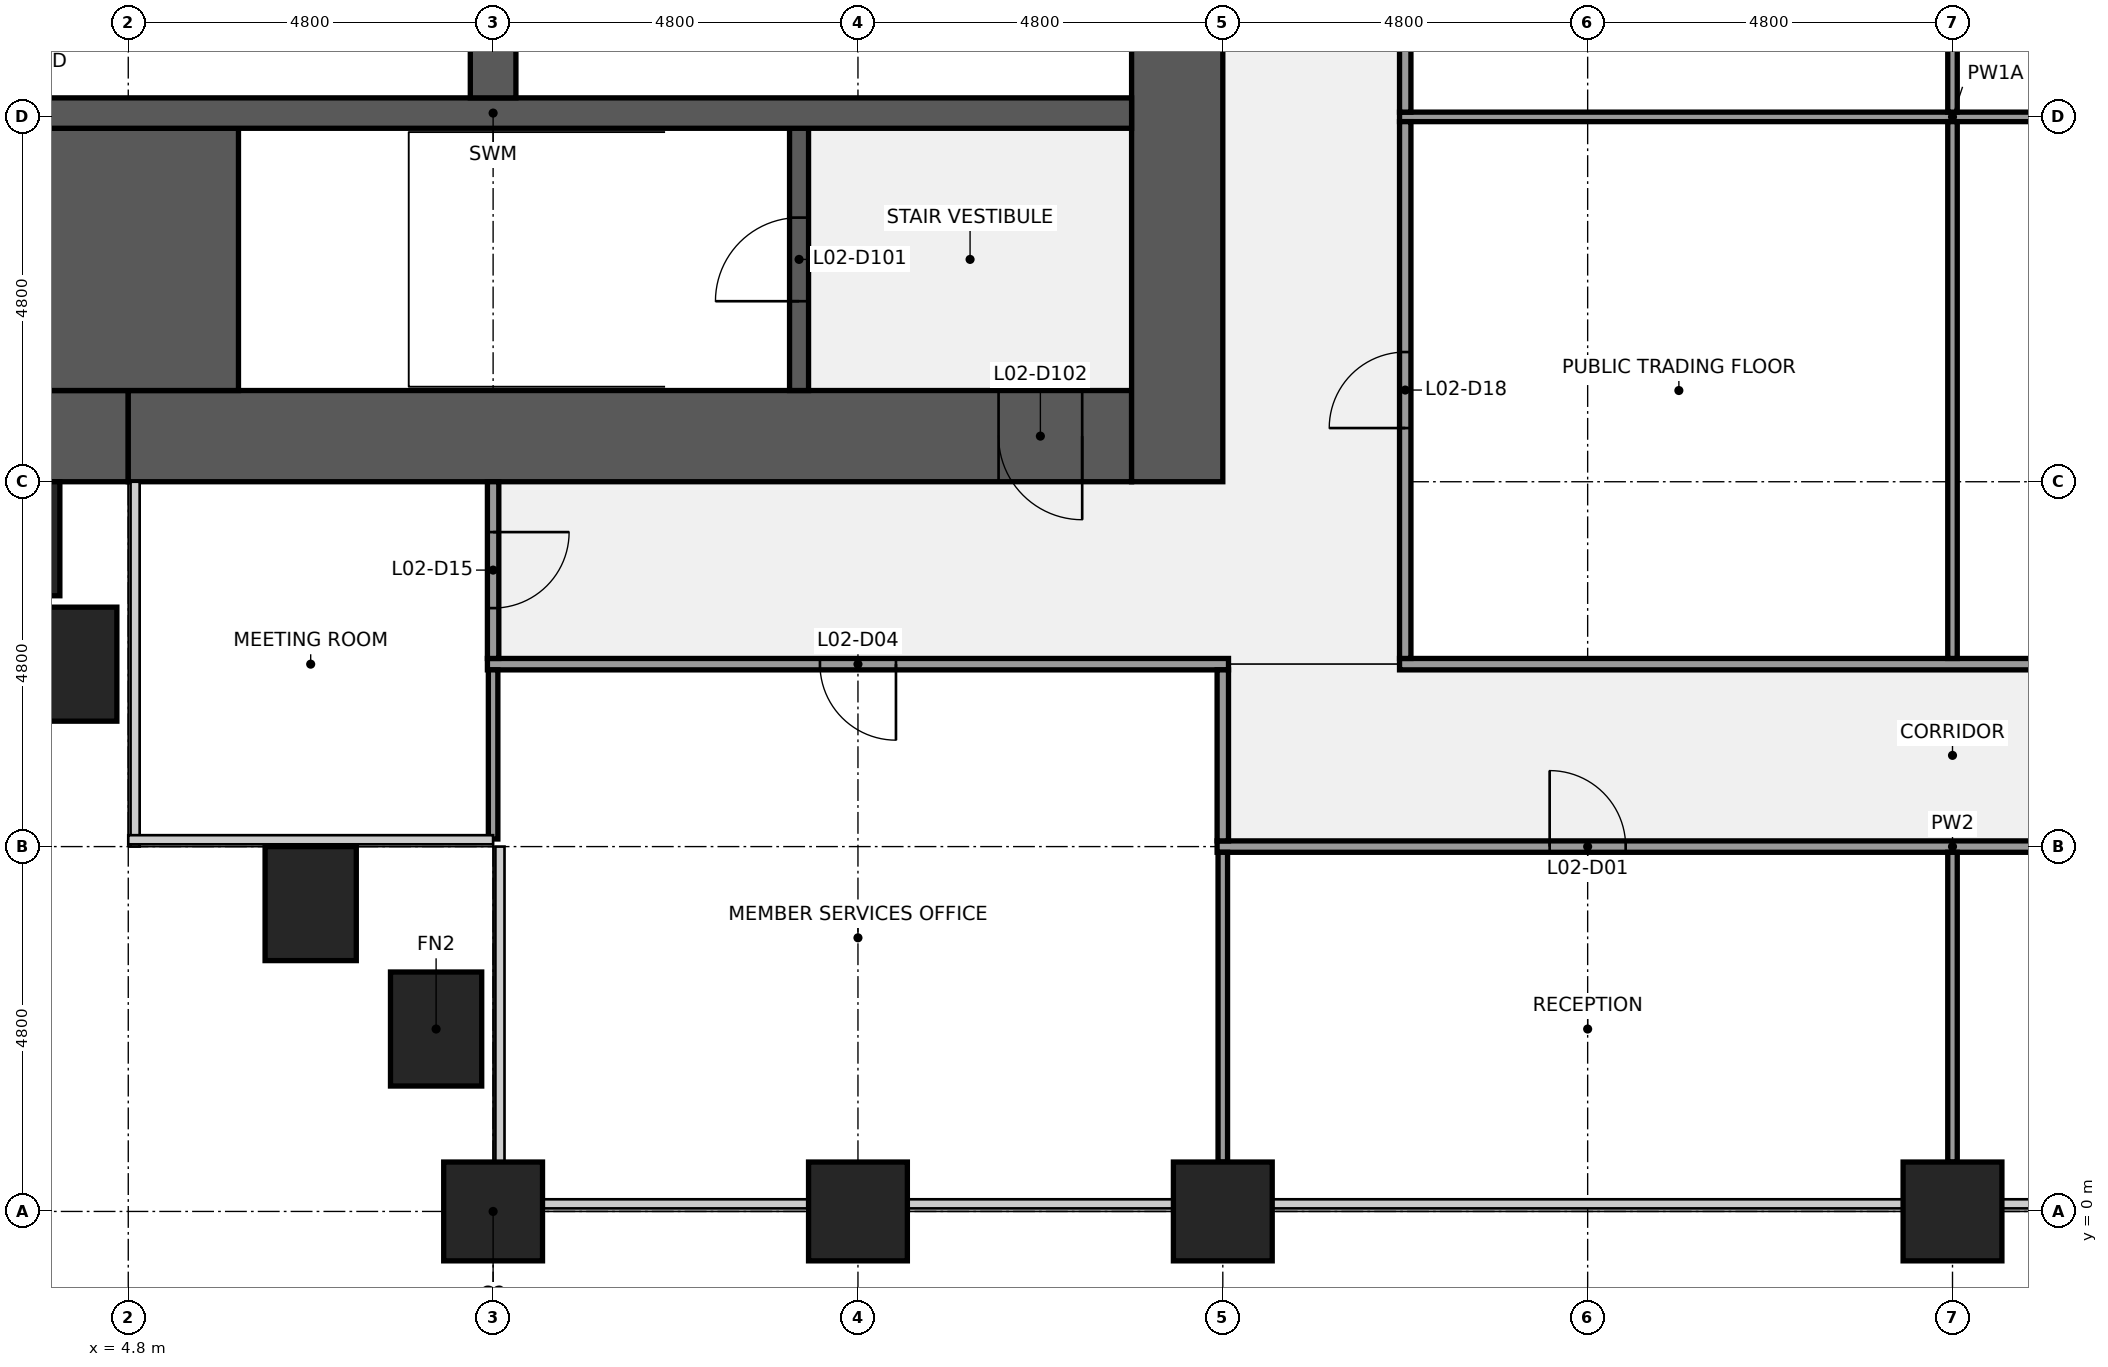
"""IFC4 building model, lengths in metres.
Left out: names, types, materials, properties, quantities, classifications, styles, units other than length and angle.
Written with IfcOpenShell. Run it as: python <this file> out.ifc"""

import sys

from ifc_helpers import new_model, si_unit, direction, frame, frame_2d, origin, origin_2d, place, context, subcontext, project, spatial, rectangle, extrude, element, fill, save


model = new_model("IFC4")
c1 = context("Model", 3, precision=1e-05, world=origin(), true_north=direction((0.0, 1.0)))
c2 = subcontext(c1, "Body", "Model", "MODEL_VIEW")
j1 = project(units=[si_unit("LENGTHUNIT", "METRE"), si_unit("PLANEANGLEUNIT", "RADIAN")], contexts=[c1])
p1 = place(None, origin())
s1 = spatial("IfcSite", under=j1, at=p1, CompositionType="ELEMENT")
p2 = place(p1, origin())
s2 = spatial("IfcBuilding", under=s1, at=p2, CompositionType="ELEMENT")
p3 = place(p2, frame((0.0, 0.0, 17.0)))
s3 = spatial("IfcBuildingStorey", under=s2, at=p3, CompositionType="ELEMENT", Elevation=17.0)
for number, where, z_axis, x_axis in (
    (1, (9.6, 0.0, 0.0), (0.0, 0.0, 1.0), (1.0, 0.0, 0.0)),
    (2, (14.4, 0.0, 0.0), (0.0, 0.0, 1.0), (1.0, 0.0, 0.0)),
    (3, (19.2, 0.0, 0.0), (0.0, 0.0, 1.0), (1.0, 0.0, 0.0)),
    (4, (28.8, 0.0, 0.0), (0.0, 0.0, 1.0), (1.0, 0.0, 0.0)),
):
    element("IfcColumn", number, at=place(p3, frame(where, z_axis=z_axis, x_axis=x_axis)), inside=s3, PredefinedType="COLUMN", context=c2, shape_type="SweptSolid", body=[
        extrude(rectangle(XDim=1.3, YDim=1.3, at=origin_2d()), origin(), (0.0, 0.0, 1.0), 4.4),
    ])
p4 = place(p3, frame((4.8, 10.2, 0.0), z_axis=(0.0, 0.0, 1.0), x_axis=(-1.0, 0.0, 0.0)))
e5 = element("IfcWall", 5, at=p4, inside=s3, PredefinedType="SHEAR", context=c2, shape_type="SweptSolid", body=[
    extrude(rectangle(XDim=3.6, YDim=1.2, at=frame_2d((1.8, 0.0))), origin(), (0.0, 0.0, 1.0), 4.24),
])
p5 = place(p3, frame((18.0, 10.2, 0.0), z_axis=(0.0, 0.0, 1.0), x_axis=(-1.0, 0.0, 0.0)))
e6 = element("IfcWall", 6, at=p5, inside=s3, PredefinedType="SHEAR", context=c2, shape_type="SweptSolid", body=[
    extrude(rectangle(XDim=13.2, YDim=1.2, at=frame_2d((6.6, 0.0))), origin(), (0.0, 0.0, 1.0), 4.24),
])
p6 = place(p5, frame((0.65, 0.0, 0.0)))
e7 = element("IfcOpeningElement", 7, at=p6, cuts=e6, PredefinedType="OPENING", context=c2, shape_type="SweptSolid", body=[
    extrude(rectangle(XDim=1.1, YDim=2.1, at=frame_2d((0.55, 1.05))), frame((0.0, 0.61, 0.0), z_axis=(0.0, -1.0, 0.0), x_axis=(1.0, 0.0, 0.0)), (0.0, 0.0, 1.0), 1.22),
])
p7 = place(p3, frame((18.6, 38.4, 0.0), z_axis=(0.0, 0.0, 1.0), x_axis=(0.0, -1.0, 0.0)))
e8 = element("IfcWall", 8, at=p7, inside=s3, PredefinedType="SHEAR", context=c2, shape_type="SweptSolid", body=[
    extrude(rectangle(XDim=28.8, YDim=1.2, at=frame_2d((14.4, 0.0))), origin(), (0.0, 0.0, 1.0), 4.24),
])
p8 = place(p7, frame((18.3, 0.0, 0.0)))
e9 = element("IfcOpeningElement", 9, at=p8, cuts=e8, PredefinedType="OPENING", context=c2, shape_type="SweptSolid", body=[
    extrude(rectangle(XDim=1.8, YDim=2.1, at=frame_2d((0.9, 1.05))), frame((0.0, 0.61, 0.0), z_axis=(0.0, -1.0, 0.0), x_axis=(1.0, 0.0, 0.0)), (0.0, 0.0, 1.0), 1.22),
])
p9 = place(p7, frame((8.7, 0.0, 0.0)))
e10 = element("IfcOpeningElement", 10, at=p9, cuts=e8, PredefinedType="OPENING", context=c2, shape_type="SweptSolid", body=[
    extrude(rectangle(XDim=1.8, YDim=2.1, at=frame_2d((0.9, 1.05))), frame((0.0, 0.61, 0.0), z_axis=(0.0, -1.0, 0.0), x_axis=(1.0, 0.0, 0.0)), (0.0, 0.0, 1.0), 1.22),
])
p10 = place(p3, frame((1.2, 12.525, 0.0), z_axis=(0.0, 0.0, 1.0), x_axis=(1.0, 0.0, 0.0)))
e11 = element("IfcWall", 11, at=p10, inside=s3, PredefinedType="SHEAR", context=c2, shape_type="SweptSolid", body=[
    extrude(rectangle(XDim=5.05, YDim=3.45, at=frame_2d((2.525, 0.0))), origin(), (0.0, 0.0, 1.0), 4.24),
])
p11 = place(p3, frame((13.625, 10.8, 0.0), z_axis=(0.0, 0.0, 1.0), x_axis=(0.0, 1.0, 0.0)))
e12 = element("IfcWall", 12, at=p11, inside=s3, PredefinedType="SHEAR", context=c2, shape_type="SweptSolid", body=[
    extrude(rectangle(XDim=3.45, YDim=0.25, at=frame_2d((1.725, 0.0))), origin(), (0.0, 0.0, 1.0), 4.24),
])
p12 = place(p11, frame((1.175, 0.0, 0.0)))
e13 = element("IfcOpeningElement", 13, at=p12, cuts=e12, PredefinedType="OPENING", context=c2, shape_type="SweptSolid", body=[
    extrude(rectangle(XDim=1.1, YDim=2.1, at=frame_2d((0.55, 1.05))), frame((0.0, 0.135, 0.0), z_axis=(0.0, -1.0, 0.0), x_axis=(1.0, 0.0, 0.0)), (0.0, 0.0, 1.0), 0.27),
])
p13 = place(p3, frame((1.2, 14.45, 0.0), z_axis=(0.0, 0.0, 1.0), x_axis=(1.0, 0.0, 0.0)))
e14 = element("IfcWall", 14, at=p13, inside=s3, PredefinedType="SHEAR", context=c2, shape_type="SweptSolid", body=[
    extrude(rectangle(XDim=16.8, YDim=0.4, at=frame_2d((8.4, 0.0))), origin(), (0.0, 0.0, 1.0), 4.24),
])
p14 = place(p3, frame((9.6, 14.65, 0.0), z_axis=(0.0, 0.0, 1.0), x_axis=(0.0, 1.0, 0.0)))
e15 = element("IfcWall", 15, at=p14, inside=s3, PredefinedType="SHEAR", context=c2, shape_type="SweptSolid", body=[
    extrude(rectangle(XDim=2.6, YDim=0.6, at=frame_2d((1.3, 0.0))), origin(), (0.0, 0.0, 1.0), 4.24),
])
p15 = place(p3, frame((19.125, 4.8, 0.0), z_axis=(0.0, 0.0, 1.0), x_axis=(1.0, 0.0, 0.0)))
e16 = element("IfcWall", 16, at=p15, inside=s3, PredefinedType="PARTITIONING", context=c2, shape_type="SweptSolid", body=[
    extrude(rectangle(XDim=19.35, YDim=0.15, at=frame_2d((9.675, 0.0))), origin(), (0.0, 0.0, 1.0), 3.25),
])
p16 = place(p15, frame((4.375, 0.0, 0.0)))
e17 = element("IfcOpeningElement", 17, at=p16, cuts=e16, PredefinedType="OPENING", context=c2, shape_type="SweptSolid", body=[
    extrude(rectangle(XDim=1.0, YDim=2.1, at=frame_2d((0.5, 1.05))), frame((0.0, 0.085, 0.0), z_axis=(0.0, -1.0, 0.0), x_axis=(1.0, 0.0, 0.0)), (0.0, 0.0, 1.0), 0.17),
])
p17 = place(p15, frame((11.575, 0.0, 0.0)))
e18 = element("IfcOpeningElement", 18, at=p17, cuts=e16, PredefinedType="OPENING", context=c2, shape_type="SweptSolid", body=[
    extrude(rectangle(XDim=1.0, YDim=2.1, at=frame_2d((0.5, 1.05))), frame((0.0, 0.085, 0.0), z_axis=(0.0, -1.0, 0.0), x_axis=(1.0, 0.0, 0.0)), (0.0, 0.0, 1.0), 0.17),
])
p18 = place(p15, frame((16.375, 0.0, 0.0)))
e19 = element("IfcOpeningElement", 19, at=p18, cuts=e16, PredefinedType="OPENING", context=c2, shape_type="SweptSolid", body=[
    extrude(rectangle(XDim=1.0, YDim=2.1, at=frame_2d((0.5, 1.05))), frame((0.0, 0.085, 0.0), z_axis=(0.0, -1.0, 0.0), x_axis=(1.0, 0.0, 0.0)), (0.0, 0.0, 1.0), 0.17),
])
p19 = place(p3, frame((9.525, 7.2, 0.0), z_axis=(0.0, 0.0, 1.0), x_axis=(1.0, 0.0, 0.0)))
e20 = element("IfcWall", 20, at=p19, inside=s3, PredefinedType="PARTITIONING", context=c2, shape_type="SweptSolid", body=[
    extrude(rectangle(XDim=9.75, YDim=0.15, at=frame_2d((4.875, 0.0))), origin(), (0.0, 0.0, 1.0), 3.25),
])
p20 = place(p19, frame((4.375, 0.0, 0.0)))
e21 = element("IfcOpeningElement", 21, at=p20, cuts=e20, PredefinedType="OPENING", context=c2, shape_type="SweptSolid", body=[
    extrude(rectangle(XDim=1.0, YDim=2.1, at=frame_2d((0.5, 1.05))), frame((0.0, 0.085, 0.0), z_axis=(0.0, -1.0, 0.0), x_axis=(1.0, 0.0, 0.0)), (0.0, 0.0, 1.0), 0.17),
])
p21 = place(p3, frame((21.525, 7.2, 0.0), z_axis=(0.0, 0.0, 1.0), x_axis=(1.0, 0.0, 0.0)))
e22 = element("IfcWall", 22, at=p21, inside=s3, PredefinedType="PARTITIONING", context=c2, shape_type="SweptSolid", body=[
    extrude(rectangle(XDim=14.55, YDim=0.15, at=frame_2d((7.275, 0.0))), origin(), (0.0, 0.0, 1.0), 3.25),
])
p22 = place(p3, frame((21.525, 14.4, 0.0), z_axis=(0.0, 0.0, 1.0), x_axis=(1.0, 0.0, 0.0)))
e23 = element("IfcWall", 23, at=p22, inside=s3, PredefinedType="PARTITIONING", context=c2, shape_type="SweptSolid", body=[
    extrude(rectangle(XDim=14.55, YDim=0.125, at=frame_2d((7.275, 0.0))), origin(), (0.0, 0.0, 1.0), 3.25),
])
p23 = place(p3, frame((9.6, 4.9, 0.0), z_axis=(0.0, 0.0, 1.0), x_axis=(0.0, 1.0, 0.0)))
e24 = element("IfcWall", 24, at=p23, inside=s3, PredefinedType="PARTITIONING", context=c2, shape_type="SweptSolid", body=[
    extrude(rectangle(XDim=2.225, YDim=0.125, at=frame_2d((1.113, 0.0))), origin(), (0.0, 0.0, 1.0), 3.25),
])
p24 = place(p3, frame((9.6, 7.275, 0.0), z_axis=(0.0, 0.0, 1.0), x_axis=(0.0, 1.0, 0.0)))
e25 = element("IfcWall", 25, at=p24, inside=s3, PredefinedType="PARTITIONING", context=c2, shape_type="SweptSolid", body=[
    extrude(rectangle(XDim=2.325, YDim=0.15, at=frame_2d((1.163, 0.0))), origin(), (0.0, 0.0, 1.0), 3.25),
])
p25 = place(p24, frame((0.663, 0.0, 0.0)))
e26 = element("IfcOpeningElement", 26, at=p25, cuts=e25, PredefinedType="OPENING", context=c2, shape_type="SweptSolid", body=[
    extrude(rectangle(XDim=1.0, YDim=2.1, at=frame_2d((0.5, 1.05))), frame((0.0, 0.085, 0.0), z_axis=(0.0, -1.0, 0.0), x_axis=(1.0, 0.0, 0.0)), (0.0, 0.0, 1.0), 0.17),
])
p26 = place(p3, frame((19.2, 0.65, 0.0), z_axis=(0.0, 0.0, 1.0), x_axis=(0.0, 1.0, 0.0)))
e27 = element("IfcWall", 27, at=p26, inside=s3, PredefinedType="PARTITIONING", context=c2, shape_type="SweptSolid", body=[
    extrude(rectangle(XDim=4.075, YDim=0.125, at=frame_2d((2.038, 0.0))), origin(), (0.0, 0.0, 1.0), 3.25),
])
p27 = place(p3, frame((19.2, 4.875, 0.0), z_axis=(0.0, 0.0, 1.0), x_axis=(0.0, 1.0, 0.0)))
e28 = element("IfcWall", 28, at=p27, inside=s3, PredefinedType="PARTITIONING", context=c2, shape_type="SweptSolid", body=[
    extrude(rectangle(XDim=2.25, YDim=0.15, at=frame_2d((1.125, 0.0))), origin(), (0.0, 0.0, 1.0), 3.25),
])
p28 = place(p3, frame((21.6, 7.275, 0.0), z_axis=(0.0, 0.0, 1.0), x_axis=(0.0, 1.0, 0.0)))
e29 = element("IfcWall", 29, at=p28, inside=s3, PredefinedType="PARTITIONING", context=c2, shape_type="SweptSolid", body=[
    extrude(rectangle(XDim=7.062, YDim=0.15, at=frame_2d((3.531, 0.0))), origin(), (0.0, 0.0, 1.0), 3.25),
])
p29 = place(p28, frame((3.031, 0.0, 0.0)))
e30 = element("IfcOpeningElement", 30, at=p29, cuts=e29, PredefinedType="OPENING", context=c2, shape_type="SweptSolid", body=[
    extrude(rectangle(XDim=1.0, YDim=2.1, at=frame_2d((0.5, 1.05))), frame((0.0, 0.085, 0.0), z_axis=(0.0, -1.0, 0.0), x_axis=(1.0, 0.0, 0.0)), (0.0, 0.0, 1.0), 0.17),
])
p30 = place(p3, frame((21.6, 14.462, 0.0), z_axis=(0.0, 0.0, 1.0), x_axis=(0.0, 1.0, 0.0)))
e31 = element("IfcWall", 31, at=p30, inside=s3, PredefinedType="PARTITIONING", context=c2, shape_type="SweptSolid", body=[
    extrude(rectangle(XDim=9.475, YDim=0.15, at=frame_2d((4.738, 0.0))), origin(), (0.0, 0.0, 1.0), 3.25),
])
p31 = place(p30, frame((4.238, 0.0, 0.0)))
e32 = element("IfcOpeningElement", 32, at=p31, cuts=e31, PredefinedType="OPENING", context=c2, shape_type="SweptSolid", body=[
    extrude(rectangle(XDim=1.0, YDim=2.1, at=frame_2d((0.5, 1.05))), frame((0.0, 0.085, 0.0), z_axis=(0.0, -1.0, 0.0), x_axis=(1.0, 0.0, 0.0)), (0.0, 0.0, 1.0), 0.17),
])
p32 = place(p3, frame((28.8, 0.65, 0.0), z_axis=(0.0, 0.0, 1.0), x_axis=(0.0, 1.0, 0.0)))
e33 = element("IfcWall", 33, at=p32, inside=s3, PredefinedType="PARTITIONING", context=c2, shape_type="SweptSolid", body=[
    extrude(rectangle(XDim=4.075, YDim=0.125, at=frame_2d((2.038, 0.0))), origin(), (0.0, 0.0, 1.0), 3.25),
])
p33 = place(p3, frame((28.8, 7.275, 0.0), z_axis=(0.0, 0.0, 1.0), x_axis=(0.0, 1.0, 0.0)))
e34 = element("IfcWall", 34, at=p33, inside=s3, PredefinedType="PARTITIONING", context=c2, shape_type="SweptSolid", body=[
    extrude(rectangle(XDim=7.062, YDim=0.125, at=frame_2d((3.531, 0.0))), origin(), (0.0, 0.0, 1.0), 3.25),
])
p34 = place(p3, frame((28.8, 14.462, 0.0), z_axis=(0.0, 0.0, 1.0), x_axis=(0.0, 1.0, 0.0)))
e35 = element("IfcWall", 35, at=p34, inside=s3, PredefinedType="PARTITIONING", context=c2, shape_type="SweptSolid", body=[
    extrude(rectangle(XDim=9.475, YDim=0.125, at=frame_2d((4.738, 0.0))), origin(), (0.0, 0.0, 1.0), 3.25),
])
for number, where, z_axis, x_axis in (
    (36, (4.05, 7.2, 0.0), (0.0, 0.0, 1.0), (0.0, 1.0, 0.0)),
    (37, (7.2, 4.05, 0.0), (0.0, 0.0, 1.0), (1.0, 0.0, 0.0)),
    (38, (8.85, 2.4, 0.0), (0.0, 0.0, 1.0), (0.0, 1.0, 0.0)),
):
    element("IfcColumn", number, at=place(p3, frame(where, z_axis=z_axis, x_axis=x_axis)), inside=s3, PredefinedType="PILASTER", context=c2, shape_type="SweptSolid", body=[
        extrude(rectangle(XDim=1.2, YDim=1.5, at=origin_2d()), origin(), (0.0, 0.0, 1.0), 4.4),
    ])
p35 = place(p3, frame((2.4, 8.85, 0.0), z_axis=(0.0, 0.0, 1.0), x_axis=(1.0, 0.0, 0.0)))
e39 = element("IfcColumn", 39, at=p35, inside=s3, PredefinedType="PILASTER", context=c2, shape_type="SweptSolid", body=[
    extrude(rectangle(XDim=3.0, YDim=1.5, at=origin_2d()), origin(), (0.0, 0.0, 1.0), 4.4),
])
for number, where, z_axis, x_axis in (
    (40, (9.6, -1.075, 0.0), (0.0, 0.0, 1.0), (1.0, 0.0, 0.0)),
    (41, (14.4, -1.075, 0.0), (0.0, 0.0, 1.0), (1.0, 0.0, 0.0)),
    (42, (19.2, -1.075, 0.0), (0.0, 0.0, 1.0), (1.0, 0.0, 0.0)),
):
    element("IfcColumn", number, at=place(p3, frame(where, z_axis=z_axis, x_axis=x_axis)), inside=s3, PredefinedType="PILASTER", context=c2, shape_type="SweptSolid", body=[
        extrude(rectangle(XDim=4.2, YDim=0.85, at=origin_2d()), origin(), (0.0, 0.0, 1.0), 4.4),
    ])
p36 = place(p12, origin())
e43 = element("IfcDoor", 43, at=p36, inside=s3, OperationType="SINGLE_SWING_LEFT", PredefinedType="DOOR", context=c2, shape_type="SweptSolid", body=[
    extrude(rectangle(XDim=1.1, YDim=2.1, at=frame_2d((0.55, 1.05))), frame((0.0, 0.025, 0.0), z_axis=(0.0, -1.0, 0.0), x_axis=(1.0, 0.0, 0.0)), (0.0, 0.0, 1.0), 0.05),
])
fill(e13, e43)
p37 = place(p6, origin())
e44 = element("IfcDoor", 44, at=p37, inside=s3, OperationType="SINGLE_SWING_LEFT", PredefinedType="DOOR", context=c2, shape_type="SweptSolid", body=[
    extrude(rectangle(XDim=1.1, YDim=2.1, at=frame_2d((0.55, 1.05))), frame((0.0, 0.025, 0.0), z_axis=(0.0, -1.0, 0.0), x_axis=(1.0, 0.0, 0.0)), (0.0, 0.0, 1.0), 0.05),
])
fill(e7, e44)
p38 = place(p16, origin())
e45 = element("IfcDoor", 45, at=p38, inside=s3, OperationType="SINGLE_SWING_LEFT", PredefinedType="DOOR", context=c2, shape_type="SweptSolid", body=[
    extrude(rectangle(XDim=1.0, YDim=2.1, at=frame_2d((0.5, 1.05))), frame((0.0, 0.025, 0.0), z_axis=(0.0, -1.0, 0.0), x_axis=(1.0, 0.0, 0.0)), (0.0, 0.0, 1.0), 0.05),
])
fill(e17, e45)
p39 = place(p20, origin())
e46 = element("IfcDoor", 46, at=p39, inside=s3, OperationType="SINGLE_SWING_RIGHT", PredefinedType="DOOR", context=c2, shape_type="SweptSolid", body=[
    extrude(rectangle(XDim=1.0, YDim=2.1, at=frame_2d((0.5, 1.05))), frame((0.0, 0.025, 0.0), z_axis=(0.0, -1.0, 0.0), x_axis=(1.0, 0.0, 0.0)), (0.0, 0.0, 1.0), 0.05),
])
fill(e21, e46)
p40 = place(p25, origin())
e47 = element("IfcDoor", 47, at=p40, inside=s3, OperationType="SINGLE_SWING_RIGHT", PredefinedType="DOOR", context=c2, shape_type="SweptSolid", body=[
    extrude(rectangle(XDim=1.0, YDim=2.1, at=frame_2d((0.5, 1.05))), frame((0.0, 0.025, 0.0), z_axis=(0.0, -1.0, 0.0), x_axis=(1.0, 0.0, 0.0)), (0.0, 0.0, 1.0), 0.05),
])
fill(e26, e47)
p41 = place(p29, origin())
e48 = element("IfcDoor", 48, at=p41, inside=s3, OperationType="SINGLE_SWING_LEFT", PredefinedType="DOOR", context=c2, shape_type="SweptSolid", body=[
    extrude(rectangle(XDim=1.0, YDim=2.1, at=frame_2d((0.5, 1.05))), frame((0.0, 0.025, 0.0), z_axis=(0.0, -1.0, 0.0), x_axis=(1.0, 0.0, 0.0)), (0.0, 0.0, 1.0), 0.05),
])
fill(e30, e48)
save(model, sys.argv[1])
